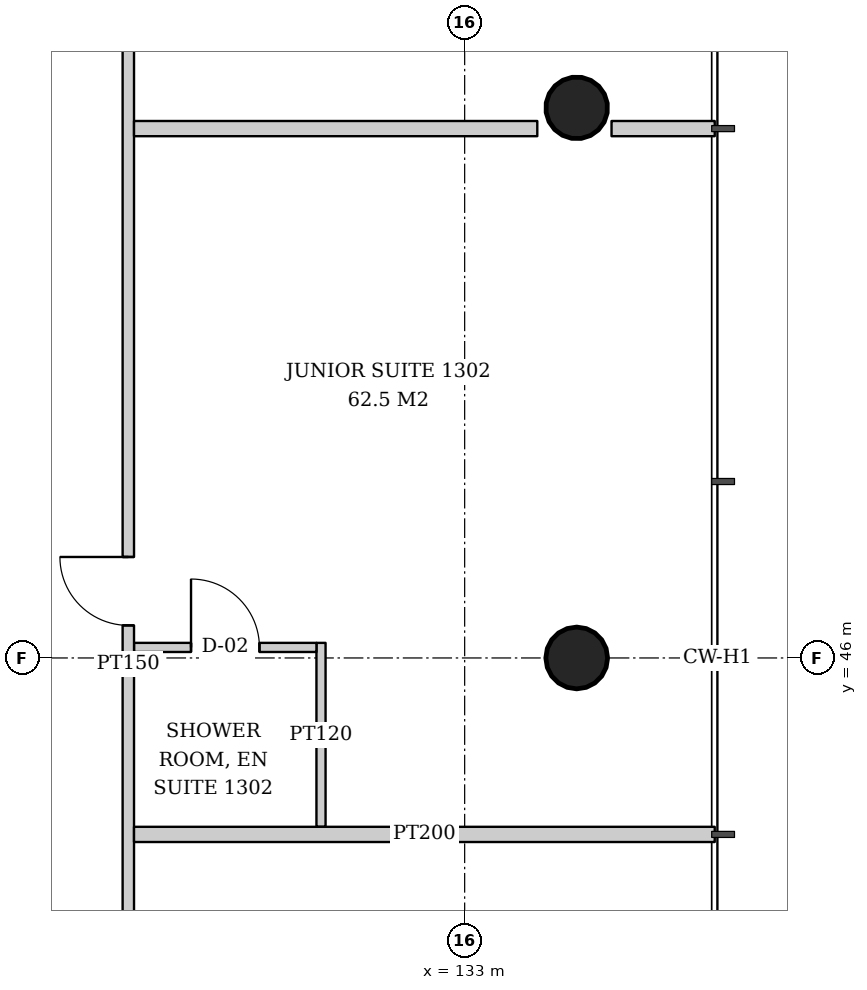
"""IFC4 building model, lengths in metres.
Left out: names, types, materials, properties, quantities, classifications, styles, units other than length and angle.
Written with IfcOpenShell. Run it as: python <this file> out.ifc"""

import sys

from ifc_helpers import new_model, si_unit, direction, frame, frame_2d, origin, origin_2d, place, context, subcontext, project, spatial, rectangle, hollow_circle, extrude, element, fill, save


model = new_model("IFC4")
c1 = context("Model", 3, precision=1e-05, world=origin(), true_north=direction((0.0, 1.0)))
c2 = subcontext(c1, "Body", "Model", "MODEL_VIEW")
j1 = project(units=[si_unit("LENGTHUNIT", "METRE"), si_unit("PLANEANGLEUNIT", "RADIAN")], contexts=[c1])
p1 = place(None, origin())
s1 = spatial("IfcSite", under=j1, at=p1, CompositionType="ELEMENT")
p2 = place(p1, origin())
s2 = spatial("IfcBuilding", under=s1, at=p2, CompositionType="ELEMENT")
p3 = place(p2, frame((0.0, 0.0, 55.2)))
s3 = spatial("IfcBuildingStorey", under=s2, at=p3, CompositionType="ELEMENT", Elevation=55.2)
p4 = place(p3, frame((134.526, 46.0, 0.0), z_axis=(-0.043069538298, 0.0, 0.999072076915), x_axis=(0.0, -1.0, 0.0)))
e1 = element("IfcColumn", 1, at=p4, inside=s3, PredefinedType="COLUMN", context=c2, shape_type="SweptSolid", body=[
    extrude(hollow_circle(Radius=0.406, WallThickness=0.03, at=origin_2d()), origin(), (0.0, 0.0, 1.0), 3.803),
])
p5 = place(p3, frame((134.526, 53.263, 0.0), z_axis=(-0.043059584825, -0.021497706284, 0.998841188968), x_axis=(0.446680166538, -0.894693706707, 0.0)))
e2 = element("IfcColumn", 2, at=p5, inside=s3, PredefinedType="COLUMN", context=c2, shape_type="SweptSolid", body=[
    extrude(hollow_circle(Radius=0.406, WallThickness=0.03, at=origin_2d()), origin(), (0.0, 0.0, 1.0), 3.804),
])
p6 = place(p3, frame((131.11, 43.779, 0.0), z_axis=(0.0, 0.0, 1.0), x_axis=(0.0, 1.0, 0.0)))
e3 = element("IfcWall", 3, at=p6, inside=s3, PredefinedType="PARTITIONING", context=c2, shape_type="SweptSolid", body=[
    extrude(rectangle(XDim=2.42, YDim=0.12, at=frame_2d((1.21, 0.0))), origin(), (0.0, 0.0, 1.0), 2.847),
])
p7 = place(p3, frame((128.65, 46.139, 0.0), z_axis=(0.0, 0.0, 1.0), x_axis=(1.0, 0.0, 0.0)))
e4 = element("IfcWall", 4, at=p7, inside=s3, PredefinedType="PARTITIONING", context=c2, shape_type="SweptSolid", body=[
    extrude(rectangle(XDim=2.4, YDim=0.12, at=frame_2d((1.2, 0.0))), origin(), (0.0, 0.0, 1.0), 3.6),
])
p8 = place(p7, frame((0.75, 0.0, 0.0)))
e5 = element("IfcOpeningElement", 5, at=p8, cuts=e4, PredefinedType="OPENING", context=c2, shape_type="SweptSolid", body=[
    extrude(rectangle(XDim=0.9, YDim=2.1, at=frame_2d((0.45, 1.05))), frame((0.0, 0.07, 0.0), z_axis=(0.0, -1.0, 0.0), x_axis=(1.0, 0.0, 0.0)), (0.0, 0.0, 1.0), 0.14),
])
p9 = place(p3, frame((128.575, 34.35, 0.0), z_axis=(0.0, 0.0, 1.0), x_axis=(0.0, 1.0, 0.0)))
e6 = element("IfcWall", 6, at=p9, inside=s3, PredefinedType="PARTITIONING", context=c2, shape_type="SweptSolid", body=[
    extrude(rectangle(XDim=23.15, YDim=0.15, at=frame_2d((11.575, 0.0))), origin(), (0.0, 0.0, 1.0), 2.8),
])
p10 = place(p9, frame((1.918, 0.0, 0.0)))
e7 = element("IfcOpeningElement", 7, at=p10, cuts=e6, PredefinedType="OPENING", context=c2, shape_type="SweptSolid", body=[
    extrude(rectangle(XDim=0.9, YDim=2.1, at=frame_2d((0.45, 1.05))), frame((0.0, 0.085, 0.0), z_axis=(0.0, -1.0, 0.0), x_axis=(1.0, 0.0, 0.0)), (0.0, 0.0, 1.0), 0.17),
])
p11 = place(p9, frame((12.079, 0.0, 0.0)))
e8 = element("IfcOpeningElement", 8, at=p11, cuts=e6, PredefinedType="OPENING", context=c2, shape_type="SweptSolid", body=[
    extrude(rectangle(XDim=0.9, YDim=2.1, at=frame_2d((0.45, 1.05))), frame((0.0, 0.085, 0.0), z_axis=(0.0, -1.0, 0.0), x_axis=(1.0, 0.0, 0.0)), (0.0, 0.0, 1.0), 0.17),
])
p12 = place(p3, frame((128.65, 43.678, 0.0), z_axis=(0.0, 0.0, 1.0), x_axis=(1.0, 0.0, 0.0)))
e9 = element("IfcWall", 9, at=p12, inside=s3, PredefinedType="PARTITIONING", context=c2, shape_type="SweptSolid", body=[
    extrude(rectangle(XDim=7.64, YDim=0.2, at=frame_2d((3.82, 0.0))), origin(), (0.0, 0.0, 1.0), 3.05),
])
p13 = place(p3, frame((128.65, 52.964, 0.0), z_axis=(0.0, 0.0, 1.0), x_axis=(1.0, 0.0, 0.0)))
e10 = element("IfcWall", 10, at=p13, inside=s3, PredefinedType="PARTITIONING", context=c2, shape_type="SweptSolid", body=[
    extrude(rectangle(XDim=5.306, YDim=0.2, at=frame_2d((2.653, 0.0))), origin(), (0.0, 0.0, 1.0), 3.6),
])
p14 = place(p3, frame((134.932, 52.964, 0.0), z_axis=(0.0, 0.0, 1.0), x_axis=(1.0, 0.0, 0.0)))
e11 = element("IfcWall", 11, at=p14, inside=s3, PredefinedType="PARTITIONING", context=c2, shape_type="SweptSolid", body=[
    extrude(rectangle(XDim=1.358, YDim=0.2, at=frame_2d((0.679, 0.0))), origin(), (0.0, 0.0, 1.0), 3.6),
])
p15 = place(p8, origin())
e12 = element("IfcDoor", 12, at=p15, inside=s3, OperationType="SINGLE_SWING_LEFT", PredefinedType="DOOR", context=c2, shape_type="SweptSolid", body=[
    extrude(rectangle(XDim=0.9, YDim=2.1, at=frame_2d((0.45, 1.05))), frame((0.0, 0.025, 0.0), z_axis=(0.0, -1.0, 0.0), x_axis=(1.0, 0.0, 0.0)), (0.0, 0.0, 1.0), 0.05),
])
fill(e5, e12)
p16 = place(p11, origin())
e13 = element("IfcDoor", 13, at=p16, inside=s3, OperationType="SINGLE_SWING_RIGHT", PredefinedType="DOOR", context=c2, shape_type="SweptSolid", body=[
    extrude(rectangle(XDim=0.9, YDim=2.1, at=frame_2d((0.45, 1.05))), frame((0.0, 0.025, 0.0), z_axis=(0.0, -1.0, 0.0), x_axis=(1.0, 0.0, 0.0)), (0.0, 0.0, 1.0), 0.05),
])
fill(e8, e13)
save(model, sys.argv[1])
